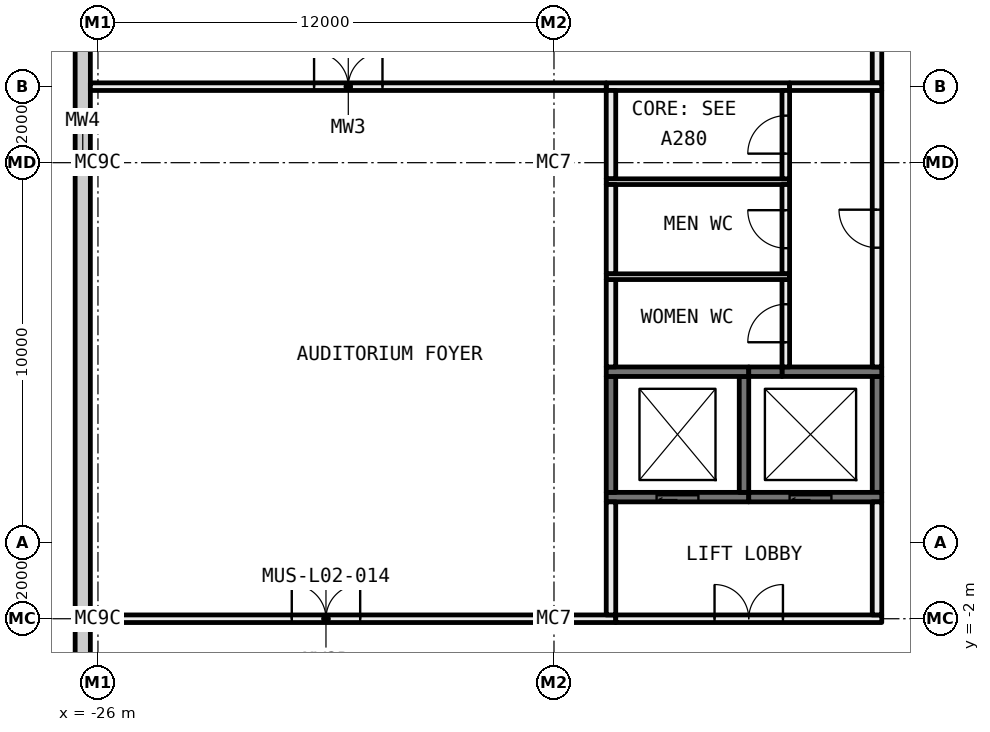
"""IFC4 building model, lengths in metres.
Left out: names, types, materials, properties, quantities, classifications, styles, units other than length and angle.
Written with IfcOpenShell. Run it as: python <this file> out.ifc"""

import sys

from ifc_helpers import new_model, si_unit, direction, frame, frame_2d, origin, origin_2d, place, context, subcontext, project, spatial, rectangle, i_section, extrude, element, fill, save


model = new_model("IFC4")
c1 = context("Model", 3, precision=1e-05, world=origin(), true_north=direction((0.0, 1.0)))
c2 = subcontext(c1, "Body", "Model", "MODEL_VIEW")
j1 = project(units=[si_unit("LENGTHUNIT", "METRE"), si_unit("PLANEANGLEUNIT", "RADIAN")], contexts=[c1])
p1 = place(None, origin())
s1 = spatial("IfcSite", under=j1, at=p1, CompositionType="ELEMENT")
p2 = place(p1, origin())
s2 = spatial("IfcBuilding", under=s1, at=p2, CompositionType="ELEMENT")
p3 = place(p2, frame((0.0, 0.0, 12.0)))
s3 = spatial("IfcBuildingStorey", under=s2, at=p3, CompositionType="ELEMENT", Elevation=12.0)
for number, where, z_axis, x_axis in (
    (1, (-26.0, -2.0, 0.0), (0.0, 0.0, 1.0), (1.0, 0.0, 0.0)),
    (2, (-26.0, 10.0, 0.0), (0.0, 0.0, 1.0), (1.0, 0.0, 0.0)),
):
    element("IfcColumn", number, at=place(p3, frame(where, z_axis=z_axis, x_axis=x_axis)), inside=s3, PredefinedType="COLUMN", context=c2, shape_type="SweptSolid", body=[
        extrude(i_section(OverallWidth=0.4, OverallDepth=0.4, WebThickness=0.013, FlangeThickness=0.021, FilletRadius=0.022, at=origin_2d()), origin(), (0.0, 0.0, 1.0), 5.6),
    ])
for number, where, z_axis, x_axis in (
    (3, (-14.0, -2.0, 0.0), (0.0, 0.0, 1.0), (1.0, 0.0, 0.0)),
    (4, (-14.0, 10.0, 0.0), (0.0, 0.0, 1.0), (1.0, 0.0, 0.0)),
):
    element("IfcColumn", number, at=place(p3, frame(where, z_axis=z_axis, x_axis=x_axis)), inside=s3, PredefinedType="COLUMN", context=c2, shape_type="SweptSolid", body=[
        extrude(i_section(OverallWidth=0.35, OverallDepth=0.35, WebThickness=0.012, FlangeThickness=0.019, FilletRadius=0.013, at=origin_2d()), origin(), (0.0, 0.0, 1.0), 5.6),
    ])
p4 = place(p3, frame((-12.625, 12.0, 0.0), z_axis=(0.0, 0.0, 1.0), x_axis=(1.0, 0.0, 0.0)))
e5 = element("IfcWall", 5, at=p4, inside=s3, PredefinedType="PARTITIONING", context=c2, shape_type="SweptSolid", body=[
    extrude(rectangle(XDim=4.825, YDim=0.2, at=frame_2d((2.413, 0.0))), origin(), (0.0, 0.0, 1.0), 5.6),
])
p5 = place(p3, frame((-12.5, 9.575, 0.0), z_axis=(0.0, 0.0, 1.0), x_axis=(0.0, 1.0, 0.0)))
e6 = element("IfcWall", 6, at=p5, inside=s3, PredefinedType="PARTITIONING", context=c2, shape_type="SweptSolid", body=[
    extrude(rectangle(XDim=2.325, YDim=0.25, at=frame_2d((1.163, 0.0))), origin(), (0.0, 0.0, 1.0), 5.6),
])
p6 = place(p3, frame((-26.2, 12.0, 0.0), z_axis=(0.0, 0.0, 1.0), x_axis=(1.0, 0.0, 0.0)))
e7 = element("IfcWall", 7, at=p6, inside=s3, PredefinedType="PARTITIONING", context=c2, shape_type="SweptSolid", body=[
    extrude(rectangle(XDim=13.575, YDim=0.2, at=frame_2d((6.788, 0.0))), origin(), (0.0, 0.0, 1.0), 5.6),
])
p7 = place(p6, frame((5.887, 0.0, 0.0)))
e8 = element("IfcOpeningElement", 8, at=p7, cuts=e7, PredefinedType="OPENING", context=c2, shape_type="SweptSolid", body=[
    extrude(rectangle(XDim=1.8, YDim=2.1, at=frame_2d((0.9, 1.05))), frame((0.0, 0.11, 0.0), z_axis=(0.0, -1.0, 0.0), x_axis=(1.0, 0.0, 0.0)), (0.0, 0.0, 1.0), 0.22),
])
p8 = place(p3, frame((-5.5, 12.1, 0.0), z_axis=(0.0, 0.0, 1.0), x_axis=(0.0, 1.0, 0.0)))
e9 = element("IfcWall", 9, at=p8, inside=s3, PredefinedType="PARTITIONING", context=c2, shape_type="SweptSolid", body=[
    extrude(rectangle(XDim=30.375, YDim=0.25, at=frame_2d((15.188, 0.0))), origin(), (0.0, 0.0, 1.0), 5.6),
])
p9 = place(p8, frame((3.0, 0.0, 0.0)))
e10 = element("IfcOpeningElement", 10, at=p9, cuts=e9, PredefinedType="OPENING", context=c2, shape_type="SweptSolid", body=[
    extrude(rectangle(XDim=1.8, YDim=2.1, at=frame_2d((0.9, 1.05))), frame((0.0, 0.135, 0.0), z_axis=(0.0, -1.0, 0.0), x_axis=(1.0, 0.0, 0.0)), (0.0, 0.0, 1.0), 0.27),
])
p10 = place(p8, frame((27.0, 0.0, 0.0)))
e11 = element("IfcOpeningElement", 11, at=p10, cuts=e9, PredefinedType="OPENING", context=c2, shape_type="SweptSolid", body=[
    extrude(rectangle(XDim=1.8, YDim=2.1, at=frame_2d((0.9, 1.05))), frame((0.0, 0.135, 0.0), z_axis=(0.0, -1.0, 0.0), x_axis=(1.0, 0.0, 0.0)), (0.0, 0.0, 1.0), 0.27),
])
p11 = place(p3, frame((-25.8, -2.0, 0.0), z_axis=(0.0, 0.0, 1.0), x_axis=(1.0, 0.0, 0.0)))
e12 = element("IfcWall", 12, at=p11, inside=s3, PredefinedType="PARTITIONING", context=c2, shape_type="SweptSolid", body=[
    extrude(rectangle(XDim=11.6, YDim=0.2, at=frame_2d((5.8, 0.0))), origin(), (0.0, 0.0, 1.0), 5.012),
])
p12 = place(p11, frame((4.9, 0.0, 0.0)))
e13 = element("IfcOpeningElement", 13, at=p12, cuts=e12, PredefinedType="OPENING", context=c2, shape_type="SweptSolid", body=[
    extrude(rectangle(XDim=1.8, YDim=2.1, at=frame_2d((0.9, 1.05))), frame((0.0, 0.11, 0.0), z_axis=(0.0, -1.0, 0.0), x_axis=(1.0, 0.0, 0.0)), (0.0, 0.0, 1.0), 0.22),
])
p13 = place(p3, frame((-13.8, -2.0, 0.0), z_axis=(0.0, 0.0, 1.0), x_axis=(1.0, 0.0, 0.0)))
e14 = element("IfcWall", 14, at=p13, inside=s3, PredefinedType="PARTITIONING", context=c2, shape_type="SweptSolid", body=[
    extrude(rectangle(XDim=1.425, YDim=0.2, at=frame_2d((0.712, 0.0))), origin(), (0.0, 0.0, 1.0), 5.012),
])
p14 = place(p3, frame((-12.375, -2.0, 0.0), z_axis=(0.0, 0.0, 1.0), x_axis=(1.0, 0.0, 0.0)))
e15 = element("IfcWall", 15, at=p14, inside=s3, PredefinedType="PARTITIONING", context=c2, shape_type="SweptSolid", body=[
    extrude(rectangle(XDim=7.0, YDim=0.2, at=frame_2d((3.5, 0.0))), origin(), (0.0, 0.0, 1.0), 5.012),
])
p15 = place(p14, frame((2.6, 0.0, 0.0)))
e16 = element("IfcOpeningElement", 16, at=p15, cuts=e15, PredefinedType="OPENING", context=c2, shape_type="SweptSolid", body=[
    extrude(rectangle(XDim=1.8, YDim=2.1, at=frame_2d((0.9, 1.05))), frame((0.0, 0.11, 0.0), z_axis=(0.0, -1.0, 0.0), x_axis=(1.0, 0.0, 0.0)), (0.0, 0.0, 1.0), 0.22),
])
p16 = place(p3, frame((-5.5, -1.9, 0.0), z_axis=(0.0, 0.0, 1.0), x_axis=(0.0, 1.0, 0.0)))
e17 = element("IfcWall", 17, at=p16, inside=s3, PredefinedType="PARTITIONING", context=c2, shape_type="SweptSolid", body=[
    extrude(rectangle(XDim=2.975, YDim=0.25, at=frame_2d((1.487, 0.0))), origin(), (0.0, 0.0, 1.0), 5.6),
])
p17 = place(p3, frame((-5.5, 1.325, 0.0), z_axis=(0.0, 0.0, 1.0), x_axis=(0.0, 1.0, 0.0)))
e18 = element("IfcWall", 18, at=p17, inside=s3, PredefinedType="SHEAR", context=c2, shape_type="SweptSolid", body=[
    extrude(rectangle(XDim=3.05, YDim=0.25, at=frame_2d((1.525, 0.0))), origin(), (0.0, 0.0, 1.0), 5.6),
])
p18 = place(p3, frame((-5.5, 4.625, 0.0), z_axis=(0.0, 0.0, 1.0), x_axis=(0.0, 1.0, 0.0)))
e19 = element("IfcWall", 19, at=p18, inside=s3, PredefinedType="PARTITIONING", context=c2, shape_type="SweptSolid", body=[
    extrude(rectangle(XDim=7.275, YDim=0.25, at=frame_2d((3.637, 0.0))), origin(), (0.0, 0.0, 1.0), 5.6),
])
p19 = place(p18, frame((3.138, 0.0, 0.0)))
e20 = element("IfcOpeningElement", 20, at=p19, cuts=e19, PredefinedType="OPENING", context=c2, shape_type="SweptSolid", body=[
    extrude(rectangle(XDim=1.0, YDim=2.1, at=frame_2d((0.5, 1.05))), frame((0.0, 0.135, 0.0), z_axis=(0.0, -1.0, 0.0), x_axis=(1.0, 0.0, 0.0)), (0.0, 0.0, 1.0), 0.27),
])
p20 = place(p3, frame((-12.5, -1.9, 0.0), z_axis=(0.0, 0.0, 1.0), x_axis=(0.0, 1.0, 0.0)))
e21 = element("IfcWall", 21, at=p20, inside=s3, PredefinedType="PARTITIONING", context=c2, shape_type="SweptSolid", body=[
    extrude(rectangle(XDim=2.975, YDim=0.25, at=frame_2d((1.487, 0.0))), origin(), (0.0, 0.0, 1.0), 5.6),
])
p21 = place(p3, frame((-12.625, 1.2, 0.0), z_axis=(0.0, 0.0, 1.0), x_axis=(1.0, 0.0, 0.0)))
e22 = element("IfcWall", 22, at=p21, inside=s3, PredefinedType="SHEAR", context=c2, shape_type="SweptSolid", body=[
    extrude(rectangle(XDim=3.75, YDim=0.25, at=frame_2d((1.875, 0.0))), origin(), (0.0, 0.0, 1.0), 5.6),
])
p22 = place(p21, frame((1.325, 0.0, 0.0)))
e23 = element("IfcOpeningElement", 23, at=p22, cuts=e22, PredefinedType="OPENING", context=c2, shape_type="SweptSolid", body=[
    extrude(rectangle(XDim=1.1, YDim=2.1, at=frame_2d((0.55, 1.05))), frame((0.0, 0.135, 0.0), z_axis=(0.0, -1.0, 0.0), x_axis=(1.0, 0.0, 0.0)), (0.0, 0.0, 1.0), 0.27),
])
p23 = place(p3, frame((-8.875, 1.2, 0.0), z_axis=(0.0, 0.0, 1.0), x_axis=(1.0, 0.0, 0.0)))
e24 = element("IfcWall", 24, at=p23, inside=s3, PredefinedType="SHEAR", context=c2, shape_type="SweptSolid", body=[
    extrude(rectangle(XDim=3.5, YDim=0.25, at=frame_2d((1.75, 0.0))), origin(), (0.0, 0.0, 1.0), 5.6),
])
p24 = place(p23, frame((1.075, 0.0, 0.0)))
e25 = element("IfcOpeningElement", 25, at=p24, cuts=e24, PredefinedType="OPENING", context=c2, shape_type="SweptSolid", body=[
    extrude(rectangle(XDim=1.1, YDim=2.1, at=frame_2d((0.55, 1.05))), frame((0.0, 0.135, 0.0), z_axis=(0.0, -1.0, 0.0), x_axis=(1.0, 0.0, 0.0)), (0.0, 0.0, 1.0), 0.27),
])
p25 = place(p3, frame((-12.625, 9.5, 0.0), z_axis=(0.0, 0.0, 1.0), x_axis=(1.0, 0.0, 0.0)))
e26 = element("IfcWall", 26, at=p25, inside=s3, PredefinedType="PARTITIONING", context=c2, shape_type="SweptSolid", body=[
    extrude(rectangle(XDim=4.825, YDim=0.15, at=frame_2d((2.413, 0.0))), origin(), (0.0, 0.0, 1.0), 5.6),
])
p26 = place(p3, frame((-12.5, 7.075, 0.0), z_axis=(0.0, 0.0, 1.0), x_axis=(0.0, 1.0, 0.0)))
e27 = element("IfcWall", 27, at=p26, inside=s3, PredefinedType="PARTITIONING", context=c2, shape_type="SweptSolid", body=[
    extrude(rectangle(XDim=2.35, YDim=0.25, at=frame_2d((1.175, 0.0))), origin(), (0.0, 0.0, 1.0), 5.6),
])
for number, where, z_axis, x_axis in (
    (28, (-12.5, 1.325, 0.0), (0.0, 0.0, 1.0), (0.0, 1.0, 0.0)),
    (29, (-9.0, 1.325, 0.0), (0.0, 0.0, 1.0), (0.0, 1.0, 0.0)),
):
    element("IfcWall", number, at=place(p3, frame(where, z_axis=z_axis, x_axis=x_axis)), inside=s3, PredefinedType="SHEAR", context=c2, shape_type="SweptSolid", body=[
        extrude(rectangle(XDim=3.05, YDim=0.25, at=frame_2d((1.525, 0.0))), origin(), (0.0, 0.0, 1.0), 5.6),
    ])
p27 = place(p3, frame((-12.625, 4.5, 0.0), z_axis=(0.0, 0.0, 1.0), x_axis=(1.0, 0.0, 0.0)))
e30 = element("IfcWall", 30, at=p27, inside=s3, PredefinedType="SHEAR", context=c2, shape_type="SweptSolid", body=[
    extrude(rectangle(XDim=3.75, YDim=0.25, at=frame_2d((1.875, 0.0))), origin(), (0.0, 0.0, 1.0), 5.6),
])
p28 = place(p3, frame((-8.0, 4.5, 0.0), z_axis=(0.0, 0.0, 1.0), x_axis=(1.0, 0.0, 0.0)))
e31 = element("IfcWall", 31, at=p28, inside=s3, PredefinedType="SHEAR", context=c2, shape_type="SweptSolid", body=[
    extrude(rectangle(XDim=2.625, YDim=0.25, at=frame_2d((1.312, 0.0))), origin(), (0.0, 0.0, 1.0), 5.6),
])
p29 = place(p3, frame((-8.875, 4.5, 0.0), z_axis=(0.0, 0.0, 1.0), x_axis=(1.0, 0.0, 0.0)))
e32 = element("IfcWall", 32, at=p29, inside=s3, PredefinedType="SHEAR", context=c2, shape_type="SweptSolid", body=[
    extrude(rectangle(XDim=0.875, YDim=0.25, at=frame_2d((0.438, 0.0))), origin(), (0.0, 0.0, 1.0), 5.6),
])
p30 = place(p3, frame((-7.9, 9.575, 0.0), z_axis=(0.0, 0.0, 1.0), x_axis=(0.0, 1.0, 0.0)))
e33 = element("IfcWall", 33, at=p30, inside=s3, PredefinedType="PARTITIONING", context=c2, shape_type="SweptSolid", body=[
    extrude(rectangle(XDim=2.325, YDim=0.2, at=frame_2d((1.163, 0.0))), origin(), (0.0, 0.0, 1.0), 5.6),
])
p31 = place(p30, frame((0.663, 0.0, 0.0)))
e34 = element("IfcOpeningElement", 34, at=p31, cuts=e33, PredefinedType="OPENING", context=c2, shape_type="SweptSolid", body=[
    extrude(rectangle(XDim=1.0, YDim=2.1, at=frame_2d((0.5, 1.05))), frame((0.0, 0.11, 0.0), z_axis=(0.0, -1.0, 0.0), x_axis=(1.0, 0.0, 0.0)), (0.0, 0.0, 1.0), 0.22),
])
p32 = place(p3, frame((-7.8, 12.0, 0.0), z_axis=(0.0, 0.0, 1.0), x_axis=(1.0, 0.0, 0.0)))
e35 = element("IfcWall", 35, at=p32, inside=s3, PredefinedType="PARTITIONING", context=c2, shape_type="SweptSolid", body=[
    extrude(rectangle(XDim=2.425, YDim=0.2, at=frame_2d((1.212, 0.0))), origin(), (0.0, 0.0, 1.0), 5.6),
])
p33 = place(p3, frame((-7.9, 7.075, 0.0), z_axis=(0.0, 0.0, 1.0), x_axis=(0.0, 1.0, 0.0)))
e36 = element("IfcWall", 36, at=p33, inside=s3, PredefinedType="PARTITIONING", context=c2, shape_type="SweptSolid", body=[
    extrude(rectangle(XDim=2.35, YDim=0.2, at=frame_2d((1.175, 0.0))), origin(), (0.0, 0.0, 1.0), 5.6),
])
p34 = place(p33, frame((0.675, 0.0, 0.0)))
e37 = element("IfcOpeningElement", 37, at=p34, cuts=e36, PredefinedType="OPENING", context=c2, shape_type="SweptSolid", body=[
    extrude(rectangle(XDim=1.0, YDim=2.1, at=frame_2d((0.5, 1.05))), frame((0.0, 0.11, 0.0), z_axis=(0.0, -1.0, 0.0), x_axis=(1.0, 0.0, 0.0)), (0.0, 0.0, 1.0), 0.22),
])
p35 = place(p3, frame((-7.9, 4.625, 0.0), z_axis=(0.0, 0.0, 1.0), x_axis=(0.0, 1.0, 0.0)))
e38 = element("IfcWall", 38, at=p35, inside=s3, PredefinedType="PARTITIONING", context=c2, shape_type="SweptSolid", body=[
    extrude(rectangle(XDim=2.3, YDim=0.2, at=frame_2d((1.15, 0.0))), origin(), (0.0, 0.0, 1.0), 5.6),
])
p36 = place(p35, frame((0.65, 0.0, 0.0)))
e39 = element("IfcOpeningElement", 39, at=p36, cuts=e38, PredefinedType="OPENING", context=c2, shape_type="SweptSolid", body=[
    extrude(rectangle(XDim=1.0, YDim=2.1, at=frame_2d((0.5, 1.05))), frame((0.0, 0.11, 0.0), z_axis=(0.0, -1.0, 0.0), x_axis=(1.0, 0.0, 0.0)), (0.0, 0.0, 1.0), 0.22),
])
p37 = place(p3, frame((-12.5, 4.625, 0.0), z_axis=(0.0, 0.0, 1.0), x_axis=(0.0, 1.0, 0.0)))
e40 = element("IfcWall", 40, at=p37, inside=s3, PredefinedType="PARTITIONING", context=c2, shape_type="SweptSolid", body=[
    extrude(rectangle(XDim=2.3, YDim=0.25, at=frame_2d((1.15, 0.0))), origin(), (0.0, 0.0, 1.0), 5.6),
])
p38 = place(p3, frame((-12.625, 7.0, 0.0), z_axis=(0.0, 0.0, 1.0), x_axis=(1.0, 0.0, 0.0)))
e41 = element("IfcWall", 41, at=p38, inside=s3, PredefinedType="PARTITIONING", context=c2, shape_type="SweptSolid", body=[
    extrude(rectangle(XDim=4.825, YDim=0.15, at=frame_2d((2.413, 0.0))), origin(), (0.0, 0.0, 1.0), 5.6),
])
p39 = place(p3, frame((-26.4, -26.2, -0.4), z_axis=(0.0, 0.0, 1.0), x_axis=(0.0, 1.0, 0.0)))
e42 = element("IfcWall", 42, at=p39, inside=s3, PredefinedType="STANDARD", context=c2, shape_type="SweptSolid", body=[
    extrude(rectangle(XDim=72.4, YDim=0.4, at=frame_2d((36.2, 0.0))), origin(), (0.0, 0.0, 1.0), 6.0),
])
p40 = place(p15, origin())
e43 = element("IfcDoor", 43, at=p40, inside=s3, OperationType="DOUBLE_DOOR_SINGLE_SWING", PredefinedType="DOOR", context=c2, shape_type="SweptSolid", body=[
    extrude(rectangle(XDim=1.8, YDim=2.1, at=frame_2d((0.9, 1.05))), frame((0.0, 0.025, 0.0), z_axis=(0.0, -1.0, 0.0), x_axis=(1.0, 0.0, 0.0)), (0.0, 0.0, 1.0), 0.05),
])
fill(e16, e43)
p41 = place(p22, origin())
e44 = element("IfcDoor", 44, at=p41, inside=s3, OperationType="SLIDING_TO_LEFT", PredefinedType="DOOR", context=c2, shape_type="SweptSolid", body=[
    extrude(rectangle(XDim=1.1, YDim=2.1, at=frame_2d((0.55, 1.05))), frame((0.0, 0.025, 0.0), z_axis=(0.0, -1.0, 0.0), x_axis=(1.0, 0.0, 0.0)), (0.0, 0.0, 1.0), 0.05),
])
fill(e23, e44)
p42 = place(p24, origin())
e45 = element("IfcDoor", 45, at=p42, inside=s3, OperationType="SLIDING_TO_LEFT", PredefinedType="DOOR", context=c2, shape_type="SweptSolid", body=[
    extrude(rectangle(XDim=1.1, YDim=2.1, at=frame_2d((0.55, 1.05))), frame((0.0, 0.025, 0.0), z_axis=(0.0, -1.0, 0.0), x_axis=(1.0, 0.0, 0.0)), (0.0, 0.0, 1.0), 0.05),
])
fill(e25, e45)
p43 = place(p19, origin())
e46 = element("IfcDoor", 46, at=p43, inside=s3, OperationType="SINGLE_SWING_LEFT", PredefinedType="DOOR", context=c2, shape_type="SweptSolid", body=[
    extrude(rectangle(XDim=1.0, YDim=2.1, at=frame_2d((0.5, 1.05))), frame((0.0, 0.025, 0.0), z_axis=(0.0, -1.0, 0.0), x_axis=(1.0, 0.0, 0.0)), (0.0, 0.0, 1.0), 0.05),
])
fill(e20, e46)
p44 = place(p36, origin())
e47 = element("IfcDoor", 47, at=p44, inside=s3, OperationType="SINGLE_SWING_RIGHT", PredefinedType="DOOR", context=c2, shape_type="SweptSolid", body=[
    extrude(rectangle(XDim=1.0, YDim=2.1, at=frame_2d((0.5, 1.05))), frame((0.0, 0.025, 0.0), z_axis=(0.0, -1.0, 0.0), x_axis=(1.0, 0.0, 0.0)), (0.0, 0.0, 1.0), 0.05),
])
fill(e39, e47)
p45 = place(p34, origin())
e48 = element("IfcDoor", 48, at=p45, inside=s3, OperationType="SINGLE_SWING_LEFT", PredefinedType="DOOR", context=c2, shape_type="SweptSolid", body=[
    extrude(rectangle(XDim=1.0, YDim=2.1, at=frame_2d((0.5, 1.05))), frame((0.0, 0.025, 0.0), z_axis=(0.0, -1.0, 0.0), x_axis=(1.0, 0.0, 0.0)), (0.0, 0.0, 1.0), 0.05),
])
fill(e37, e48)
p46 = place(p31, origin())
e49 = element("IfcDoor", 49, at=p46, inside=s3, OperationType="SINGLE_SWING_RIGHT", PredefinedType="DOOR", context=c2, shape_type="SweptSolid", body=[
    extrude(rectangle(XDim=1.0, YDim=2.1, at=frame_2d((0.5, 1.05))), frame((0.0, 0.025, 0.0), z_axis=(0.0, -1.0, 0.0), x_axis=(1.0, 0.0, 0.0)), (0.0, 0.0, 1.0), 0.05),
])
fill(e34, e49)
p47 = place(p12, origin())
e50 = element("IfcDoor", 50, at=p47, inside=s3, OperationType="DOUBLE_DOOR_SINGLE_SWING", PredefinedType="DOOR", context=c2, shape_type="SweptSolid", body=[
    extrude(rectangle(XDim=1.8, YDim=2.1, at=frame_2d((0.9, 1.05))), frame((0.0, 0.025, 0.0), z_axis=(0.0, -1.0, 0.0), x_axis=(1.0, 0.0, 0.0)), (0.0, 0.0, 1.0), 0.05),
])
fill(e13, e50)
p48 = place(p7, origin())
e51 = element("IfcDoor", 51, at=p48, inside=s3, OperationType="DOUBLE_DOOR_SINGLE_SWING", PredefinedType="DOOR", context=c2, shape_type="SweptSolid", body=[
    extrude(rectangle(XDim=1.8, YDim=2.1, at=frame_2d((0.9, 1.05))), frame((0.0, 0.025, 0.0), z_axis=(0.0, -1.0, 0.0), x_axis=(1.0, 0.0, 0.0)), (0.0, 0.0, 1.0), 0.05),
])
fill(e8, e51)
save(model, sys.argv[1])
